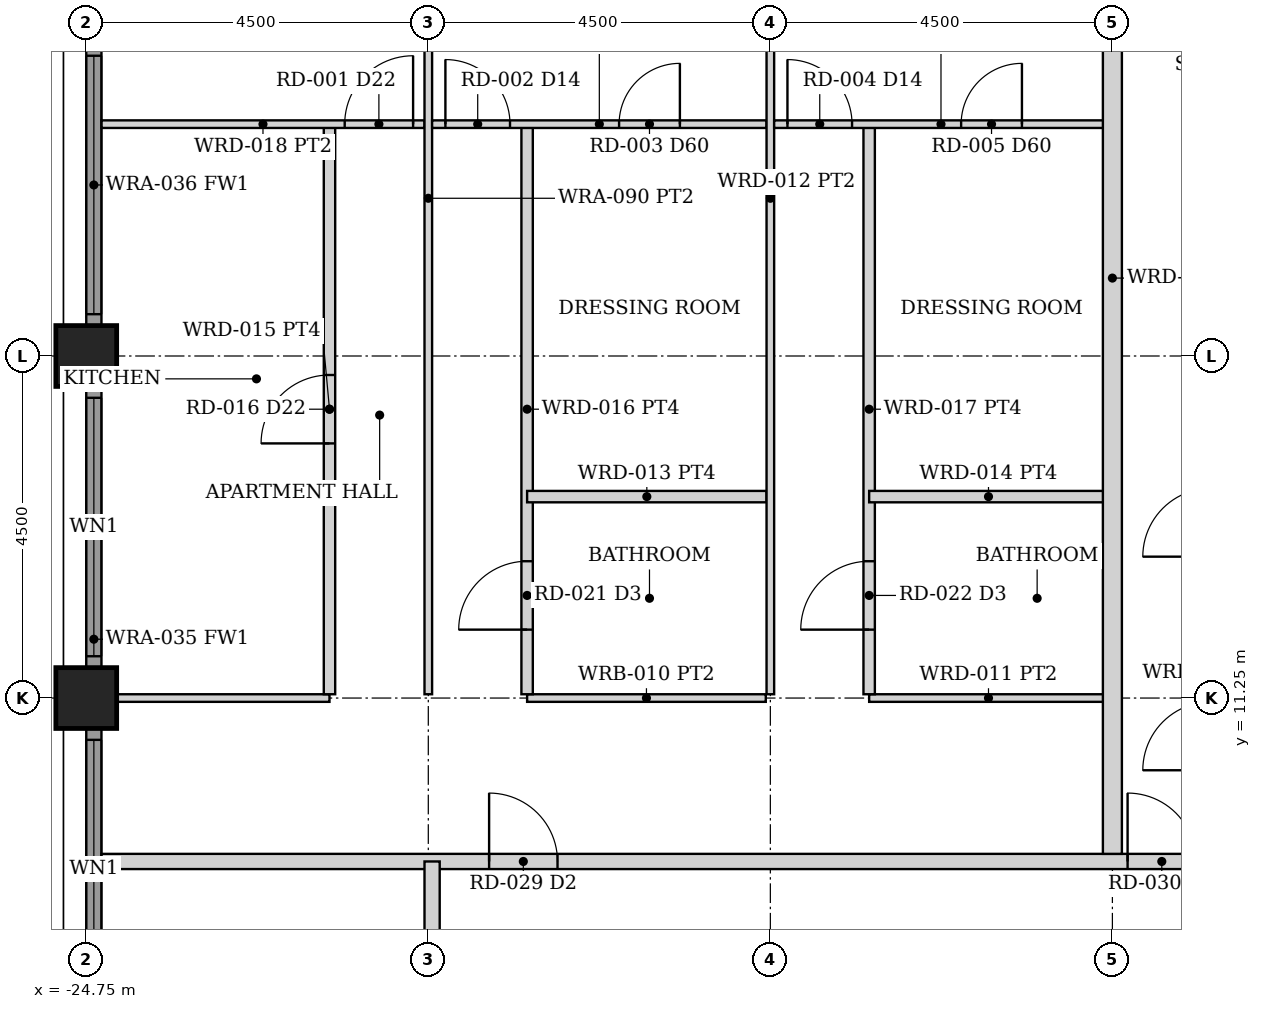
"""IFC4 building model, lengths in metres.
Left out: names, types, materials, properties, quantities, classifications, styles, units other than length and angle.
Written with IfcOpenShell. Run it as: python <this file> out.ifc"""

import sys

from ifc_helpers import new_model, si_unit, direction, frame, frame_2d, origin, origin_2d, place, context, subcontext, project, spatial, rectangle, hollow_rectangle, extrude, element, fill, save


model = new_model("IFC4")
c1 = context("Model", 3, precision=1e-05, world=origin(), true_north=direction((0.0, 1.0)))
c2 = subcontext(c1, "Body", "Model", "MODEL_VIEW")
j1 = project(units=[si_unit("LENGTHUNIT", "METRE"), si_unit("PLANEANGLEUNIT", "RADIAN")], contexts=[c1])
p1 = place(None, origin())
s1 = spatial("IfcSite", under=j1, at=p1, CompositionType="ELEMENT")
p2 = place(p1, origin())
s2 = spatial("IfcBuilding", under=s1, at=p2, CompositionType="ELEMENT")
p3 = place(p2, frame((0.0, 0.0, 58.0)))
s3 = spatial("IfcBuildingStorey", under=s2, at=p3, CompositionType="ELEMENT", Elevation=58.0)
for number, where, z_axis, x_axis in (
    (1, (-24.75, 11.25, 0.0), (0.0, 0.0, 1.0), (1.0, 0.0, 0.0)),
    (2, (-24.75, 15.75, 0.0), (0.0, 0.0, 1.0), (1.0, 0.0, 0.0)),
):
    element("IfcColumn", number, at=place(p3, frame(where, z_axis=z_axis, x_axis=x_axis)), inside=s3, PredefinedType="COLUMN", context=c2, shape_type="SweptSolid", body=[
        extrude(hollow_rectangle(XDim=0.8, YDim=0.8, WallThickness=0.06, at=origin_2d()), origin(), (0.0, 0.0, 1.0), 3.5),
    ])
p4 = place(p3, frame((-24.65, 7.155, 0.0), z_axis=(0.0, 0.0, 1.0), x_axis=(0.0, 1.0, 0.0)))
e3 = element("IfcWall", 3, at=p4, inside=s3, PredefinedType="SOLIDWALL", context=c2, shape_type="SweptSolid", body=[
    extrude(rectangle(XDim=3.69, YDim=0.2, at=frame_2d((1.845, 0.0))), origin(), (0.0, 0.0, 1.0), 2.379),
])
p5 = place(p4, frame((0.145, 0.0, 0.3)))
e4 = element("IfcOpeningElement", 4, at=p5, cuts=e3, PredefinedType="OPENING", context=c2, shape_type="SweptSolid", body=[
    extrude(rectangle(XDim=3.4, YDim=1.929, at=frame_2d((1.7, 0.964))), frame((0.0, 0.11, 0.0), z_axis=(0.0, -1.0, 0.0), x_axis=(1.0, 0.0, 0.0)), (0.0, 0.0, 1.0), 0.22),
])
p6 = place(p3, frame((-24.65, 11.655, 0.0), z_axis=(0.0, 0.0, 1.0), x_axis=(0.0, 1.0, 0.0)))
e5 = element("IfcWall", 5, at=p6, inside=s3, PredefinedType="SOLIDWALL", context=c2, shape_type="SweptSolid", body=[
    extrude(rectangle(XDim=3.69, YDim=0.2, at=frame_2d((1.845, 0.0))), origin(), (0.0, 0.0, 1.0), 2.379),
])
p7 = place(p6, frame((0.145, 0.0, 0.3)))
e6 = element("IfcOpeningElement", 6, at=p7, cuts=e5, PredefinedType="OPENING", context=c2, shape_type="SweptSolid", body=[
    extrude(rectangle(XDim=3.4, YDim=1.929, at=frame_2d((1.7, 0.964))), frame((0.0, 0.11, 0.0), z_axis=(0.0, -1.0, 0.0), x_axis=(1.0, 0.0, 0.0)), (0.0, 0.0, 1.0), 0.22),
])
p8 = place(p3, frame((-24.65, 16.155, 0.0), z_axis=(0.0, 0.0, 1.0), x_axis=(0.0, 1.0, 0.0)))
e7 = element("IfcWall", 7, at=p8, inside=s3, PredefinedType="SOLIDWALL", context=c2, shape_type="SweptSolid", body=[
    extrude(rectangle(XDim=3.69, YDim=0.2, at=frame_2d((1.845, 0.0))), origin(), (0.0, 0.0, 1.0), 2.379),
])
p9 = place(p8, frame((0.145, 0.0, 0.3)))
e8 = element("IfcOpeningElement", 8, at=p9, cuts=e7, PredefinedType="OPENING", context=c2, shape_type="SweptSolid", body=[
    extrude(rectangle(XDim=3.4, YDim=1.929, at=frame_2d((1.7, 0.964))), frame((0.0, 0.11, 0.0), z_axis=(0.0, -1.0, 0.0), x_axis=(1.0, 0.0, 0.0)), (0.0, 0.0, 1.0), 0.22),
])
p10 = place(p3, frame((-24.55, 9.1, 0.0), z_axis=(0.0, 0.0, 1.0), x_axis=(1.0, 0.0, 0.0)))
e9 = element("IfcWall", 9, at=p10, inside=s3, PredefinedType="PARTITIONING", context=c2, shape_type="SweptSolid", body=[
    extrude(rectangle(XDim=49.1, YDim=0.2, at=frame_2d((24.55, 0.0))), origin(), (0.0, 0.0, 1.0), 2.373),
])
p11 = place(p10, frame((5.1, 0.0, 0.0)))
e10 = element("IfcOpeningElement", 10, at=p11, cuts=e9, PredefinedType="OPENING", context=c2, shape_type="SweptSolid", body=[
    extrude(rectangle(XDim=0.9, YDim=2.1, at=frame_2d((0.45, 1.05))), frame((0.0, 0.11, 0.0), z_axis=(0.0, -1.0, 0.0), x_axis=(1.0, 0.0, 0.0)), (0.0, 0.0, 1.0), 0.22),
])
p12 = place(p10, frame((13.5, 0.0, 0.0)))
e11 = element("IfcOpeningElement", 11, at=p12, cuts=e9, PredefinedType="OPENING", context=c2, shape_type="SweptSolid", body=[
    extrude(rectangle(XDim=0.9, YDim=2.1, at=frame_2d((0.45, 1.05))), frame((0.0, 0.11, 0.0), z_axis=(0.0, -1.0, 0.0), x_axis=(1.0, 0.0, 0.0)), (0.0, 0.0, 1.0), 0.22),
])
p13 = place(p10, frame((18.1, 0.0, 0.0)))
e12 = element("IfcOpeningElement", 12, at=p13, cuts=e9, PredefinedType="OPENING", context=c2, shape_type="SweptSolid", body=[
    extrude(rectangle(XDim=0.9, YDim=2.1, at=frame_2d((0.45, 1.05))), frame((0.0, 0.11, 0.0), z_axis=(0.0, -1.0, 0.0), x_axis=(1.0, 0.0, 0.0)), (0.0, 0.0, 1.0), 0.22),
])
p14 = place(p10, frame((31.5, 0.0, 0.0)))
e13 = element("IfcOpeningElement", 13, at=p14, cuts=e9, PredefinedType="OPENING", context=c2, shape_type="SweptSolid", body=[
    extrude(rectangle(XDim=0.9, YDim=2.1, at=frame_2d((0.45, 1.05))), frame((0.0, 0.11, 0.0), z_axis=(0.0, -1.0, 0.0), x_axis=(1.0, 0.0, 0.0)), (0.0, 0.0, 1.0), 0.22),
])
p15 = place(p10, frame((43.1, 0.0, 0.0)))
e14 = element("IfcOpeningElement", 14, at=p15, cuts=e9, PredefinedType="OPENING", context=c2, shape_type="SweptSolid", body=[
    extrude(rectangle(XDim=0.9, YDim=2.1, at=frame_2d((0.45, 1.05))), frame((0.0, 0.11, 0.0), z_axis=(0.0, -1.0, 0.0), x_axis=(1.0, 0.0, 0.0)), (0.0, 0.0, 1.0), 0.22),
])
p16 = place(p3, frame((-20.2, -9.1, 0.0), z_axis=(0.0, 0.0, 1.0), x_axis=(0.0, 1.0, 0.0)))
e15 = element("IfcWall", 15, at=p16, inside=s3, PredefinedType="PARTITIONING", context=c2, shape_type="SweptSolid", body=[
    extrude(rectangle(XDim=18.2, YDim=0.2, at=frame_2d((9.1, 0.0))), origin(), (0.0, 0.0, 1.0), 2.373),
])
p17 = place(p16, frame((8.6, 0.0, 0.0)))
e16 = element("IfcOpeningElement", 16, at=p17, cuts=e15, PredefinedType="OPENING", context=c2, shape_type="SweptSolid", body=[
    extrude(rectangle(XDim=1.0, YDim=2.1, at=frame_2d((0.5, 1.05))), frame((0.0, 0.11, 0.0), z_axis=(0.0, -1.0, 0.0), x_axis=(1.0, 0.0, 0.0)), (0.0, 0.0, 1.0), 0.22),
])
p18 = place(p3, frame((-24.35, 11.25, 0.0), z_axis=(0.0, 0.0, 1.0), x_axis=(1.0, 0.0, 0.0)))
e17 = element("IfcWall", 17, at=p18, inside=s3, PredefinedType="PARTITIONING", context=c2, shape_type="SweptSolid", body=[
    extrude(rectangle(XDim=2.8, YDim=0.1, at=frame_2d((1.4, 0.0))), origin(), (0.0, 0.0, 1.0), 2.373),
])
p19 = place(p3, frame((-21.55, 11.3, 0.0), z_axis=(0.0, 0.0, 1.0), x_axis=(0.0, 1.0, 0.0)))
e18 = element("IfcWall", 18, at=p19, inside=s3, PredefinedType="PARTITIONING", context=c2, shape_type="SweptSolid", body=[
    extrude(rectangle(XDim=7.5, YDim=0.15, at=frame_2d((3.75, 0.0))), origin(), (0.0, 0.0, 1.0), 2.373),
])
p20 = place(p19, frame((3.3, 0.0, 0.0)))
e19 = element("IfcOpeningElement", 19, at=p20, cuts=e18, PredefinedType="OPENING", context=c2, shape_type="SweptSolid", body=[
    extrude(rectangle(XDim=0.9, YDim=2.1, at=frame_2d((0.45, 1.05))), frame((0.0, 0.085, 0.0), z_axis=(0.0, -1.0, 0.0), x_axis=(1.0, 0.0, 0.0)), (0.0, 0.0, 1.0), 0.17),
])
p21 = place(p3, frame((-24.55, 18.8, 0.0), z_axis=(0.0, 0.0, 1.0), x_axis=(1.0, 0.0, 0.0)))
e20 = element("IfcWall", 20, at=p21, inside=s3, PredefinedType="PARTITIONING", context=c2, shape_type="SweptSolid", body=[
    extrude(rectangle(XDim=4.25, YDim=0.1, at=frame_2d((2.125, 0.0))), origin(), (0.0, 0.0, 1.0), 2.373),
])
p22 = place(p21, frame((3.2, 0.0, 0.0)))
e21 = element("IfcOpeningElement", 21, at=p22, cuts=e20, PredefinedType="OPENING", context=c2, shape_type="SweptSolid", body=[
    extrude(rectangle(XDim=0.9, YDim=2.1, at=frame_2d((0.45, 1.05))), frame((0.0, 0.06, 0.0), z_axis=(0.0, -1.0, 0.0), x_axis=(1.0, 0.0, 0.0)), (0.0, 0.0, 1.0), 0.12),
])
p23 = place(p3, frame((-20.25, 11.3, 0.0), z_axis=(0.0, 0.0, 1.0), x_axis=(0.0, 1.0, 0.0)))
e22 = element("IfcWall", 22, at=p23, inside=s3, PredefinedType="PARTITIONING", context=c2, shape_type="SweptSolid", body=[
    extrude(rectangle(XDim=13.05, YDim=0.1, at=frame_2d((6.525, 0.0))), origin(), (0.0, 0.0, 1.0), 2.373),
])
p24 = place(p3, frame((-18.95, 11.25, 0.0), z_axis=(0.0, 0.0, 1.0), x_axis=(1.0, 0.0, 0.0)))
e23 = element("IfcWall", 23, at=p24, inside=s3, PredefinedType="PARTITIONING", context=c2, shape_type="SweptSolid", body=[
    extrude(rectangle(XDim=3.14, YDim=0.1, at=frame_2d((1.57, 0.0))), origin(), (0.0, 0.0, 1.0), 2.373),
])
p25 = place(p3, frame((-18.95, 11.3, 0.0), z_axis=(0.0, 0.0, 1.0), x_axis=(0.0, 1.0, 0.0)))
e24 = element("IfcWall", 24, at=p25, inside=s3, PredefinedType="PARTITIONING", context=c2, shape_type="SweptSolid", body=[
    extrude(rectangle(XDim=7.5, YDim=0.15, at=frame_2d((3.75, 0.0))), origin(), (0.0, 0.0, 1.0), 2.373),
])
p26 = place(p25, frame((0.85, 0.0, 0.0)))
e25 = element("IfcOpeningElement", 25, at=p26, cuts=e24, PredefinedType="OPENING", context=c2, shape_type="SweptSolid", body=[
    extrude(rectangle(XDim=0.9, YDim=2.1, at=frame_2d((0.45, 1.05))), frame((0.0, 0.085, 0.0), z_axis=(0.0, -1.0, 0.0), x_axis=(1.0, 0.0, 0.0)), (0.0, 0.0, 1.0), 0.17),
])
p27 = place(p3, frame((-20.2, 18.8, 0.0), z_axis=(0.0, 0.0, 1.0), x_axis=(1.0, 0.0, 0.0)))
e26 = element("IfcWall", 26, at=p27, inside=s3, PredefinedType="PARTITIONING", context=c2, shape_type="SweptSolid", body=[
    extrude(rectangle(XDim=4.4, YDim=0.1, at=frame_2d((2.2, 0.0))), origin(), (0.0, 0.0, 1.0), 2.373),
])
p28 = place(p27, frame((0.175, 0.0, 0.0)))
e27 = element("IfcOpeningElement", 27, at=p28, cuts=e26, PredefinedType="OPENING", context=c2, shape_type="SweptSolid", body=[
    extrude(rectangle(XDim=0.85, YDim=2.1, at=frame_2d((0.425, 1.05))), frame((0.0, 0.06, 0.0), z_axis=(0.0, -1.0, 0.0), x_axis=(1.0, 0.0, 0.0)), (0.0, 0.0, 1.0), 0.12),
])
p29 = place(p27, frame((2.46, 0.0, 0.0)))
e28 = element("IfcOpeningElement", 28, at=p29, cuts=e26, PredefinedType="OPENING", context=c2, shape_type="SweptSolid", body=[
    extrude(rectangle(XDim=0.8, YDim=2.1, at=frame_2d((0.4, 1.05))), frame((0.0, 0.06, 0.0), z_axis=(0.0, -1.0, 0.0), x_axis=(1.0, 0.0, 0.0)), (0.0, 0.0, 1.0), 0.12),
])
p30 = place(p3, frame((-18.95, 13.9, 0.0), z_axis=(0.0, 0.0, 1.0), x_axis=(1.0, 0.0, 0.0)))
e29 = element("IfcWall", 29, at=p30, inside=s3, PredefinedType="PARTITIONING", context=c2, shape_type="SweptSolid", body=[
    extrude(rectangle(XDim=3.15, YDim=0.15, at=frame_2d((1.575, 0.0))), origin(), (0.0, 0.0, 1.0), 2.373),
])
p31 = place(p3, frame((-15.75, 11.3, 0.0), z_axis=(0.0, 0.0, 1.0), x_axis=(0.0, 1.0, 0.0)))
e30 = element("IfcWall", 30, at=p31, inside=s3, PredefinedType="PARTITIONING", context=c2, shape_type="SweptSolid", body=[
    extrude(rectangle(XDim=13.05, YDim=0.1, at=frame_2d((6.525, 0.0))), origin(), (0.0, 0.0, 1.0), 2.373),
])
p32 = place(p3, frame((-14.45, 11.25, 0.0), z_axis=(0.0, 0.0, 1.0), x_axis=(1.0, 0.0, 0.0)))
e31 = element("IfcWall", 31, at=p32, inside=s3, PredefinedType="PARTITIONING", context=c2, shape_type="SweptSolid", body=[
    extrude(rectangle(XDim=3.14, YDim=0.1, at=frame_2d((1.57, 0.0))), origin(), (0.0, 0.0, 1.0), 2.373),
])
p33 = place(p3, frame((-14.45, 11.3, 0.0), z_axis=(0.0, 0.0, 1.0), x_axis=(0.0, 1.0, 0.0)))
e32 = element("IfcWall", 32, at=p33, inside=s3, PredefinedType="PARTITIONING", context=c2, shape_type="SweptSolid", body=[
    extrude(rectangle(XDim=7.5, YDim=0.15, at=frame_2d((3.75, 0.0))), origin(), (0.0, 0.0, 1.0), 2.373),
])
p34 = place(p33, frame((0.85, 0.0, 0.0)))
e33 = element("IfcOpeningElement", 33, at=p34, cuts=e32, PredefinedType="OPENING", context=c2, shape_type="SweptSolid", body=[
    extrude(rectangle(XDim=0.9, YDim=2.1, at=frame_2d((0.45, 1.05))), frame((0.0, 0.085, 0.0), z_axis=(0.0, -1.0, 0.0), x_axis=(1.0, 0.0, 0.0)), (0.0, 0.0, 1.0), 0.17),
])
p35 = place(p3, frame((-15.7, 18.8, 0.0), z_axis=(0.0, 0.0, 1.0), x_axis=(1.0, 0.0, 0.0)))
e34 = element("IfcWall", 34, at=p35, inside=s3, PredefinedType="PARTITIONING", context=c2, shape_type="SweptSolid", body=[
    extrude(rectangle(XDim=4.39, YDim=0.1, at=frame_2d((2.195, 0.0))), origin(), (0.0, 0.0, 1.0), 2.373),
])
p36 = place(p35, frame((0.175, 0.0, 0.0)))
e35 = element("IfcOpeningElement", 35, at=p36, cuts=e34, PredefinedType="OPENING", context=c2, shape_type="SweptSolid", body=[
    extrude(rectangle(XDim=0.85, YDim=2.1, at=frame_2d((0.425, 1.05))), frame((0.0, 0.06, 0.0), z_axis=(0.0, -1.0, 0.0), x_axis=(1.0, 0.0, 0.0)), (0.0, 0.0, 1.0), 0.12),
])
p37 = place(p35, frame((2.46, 0.0, 0.0)))
e36 = element("IfcOpeningElement", 36, at=p37, cuts=e34, PredefinedType="OPENING", context=c2, shape_type="SweptSolid", body=[
    extrude(rectangle(XDim=0.8, YDim=2.1, at=frame_2d((0.4, 1.05))), frame((0.0, 0.06, 0.0), z_axis=(0.0, -1.0, 0.0), x_axis=(1.0, 0.0, 0.0)), (0.0, 0.0, 1.0), 0.12),
])
p38 = place(p3, frame((-14.45, 13.9, 0.0), z_axis=(0.0, 0.0, 1.0), x_axis=(1.0, 0.0, 0.0)))
e37 = element("IfcWall", 37, at=p38, inside=s3, PredefinedType="PARTITIONING", context=c2, shape_type="SweptSolid", body=[
    extrude(rectangle(XDim=3.14, YDim=0.15, at=frame_2d((1.57, 0.0))), origin(), (0.0, 0.0, 1.0), 2.373),
])
p39 = place(p3, frame((-11.25, 9.2, 0.0), z_axis=(0.0, 0.0, 1.0), x_axis=(0.0, 1.0, 0.0)))
e38 = element("IfcWall", 38, at=p39, inside=s3, PredefinedType="PARTITIONING", context=c2, shape_type="SweptSolid", body=[
    extrude(rectangle(XDim=15.15, YDim=0.25, at=frame_2d((7.575, 0.0))), origin(), (0.0, 0.0, 1.0), 2.373),
])
p40 = place(p5, origin())
e39 = element("IfcWindow", 39, at=p40, inside=s3, PartitioningType="SINGLE_PANEL", PredefinedType="WINDOW", context=c2, shape_type="SweptSolid", body=[
    extrude(rectangle(XDim=3.4, YDim=1.929, at=frame_2d((1.7, 0.964))), frame((0.0, 0.03, 0.0), z_axis=(0.0, -1.0, 0.0), x_axis=(1.0, 0.0, 0.0)), (0.0, 0.0, 1.0), 0.06),
])
fill(e4, e39)
p41 = place(p7, origin())
e40 = element("IfcWindow", 40, at=p41, inside=s3, PartitioningType="SINGLE_PANEL", PredefinedType="WINDOW", context=c2, shape_type="SweptSolid", body=[
    extrude(rectangle(XDim=3.4, YDim=1.929, at=frame_2d((1.7, 0.964))), frame((0.0, 0.03, 0.0), z_axis=(0.0, -1.0, 0.0), x_axis=(1.0, 0.0, 0.0)), (0.0, 0.0, 1.0), 0.06),
])
fill(e6, e40)
p42 = place(p9, origin())
e41 = element("IfcWindow", 41, at=p42, inside=s3, PartitioningType="SINGLE_PANEL", PredefinedType="WINDOW", context=c2, shape_type="SweptSolid", body=[
    extrude(rectangle(XDim=3.4, YDim=1.929, at=frame_2d((1.7, 0.964))), frame((0.0, 0.03, 0.0), z_axis=(0.0, -1.0, 0.0), x_axis=(1.0, 0.0, 0.0)), (0.0, 0.0, 1.0), 0.06),
])
fill(e8, e41)
p43 = place(p11, origin())
e42 = element("IfcDoor", 42, at=p43, inside=s3, OperationType="SINGLE_SWING_LEFT", PredefinedType="DOOR", context=c2, shape_type="SweptSolid", body=[
    extrude(rectangle(XDim=0.9, YDim=2.1, at=frame_2d((0.45, 1.05))), frame((0.0, 0.025, 0.0), z_axis=(0.0, -1.0, 0.0), x_axis=(1.0, 0.0, 0.0)), (0.0, 0.0, 1.0), 0.05),
])
fill(e10, e42)
p44 = place(p20, origin())
e43 = element("IfcDoor", 43, at=p44, inside=s3, OperationType="SINGLE_SWING_LEFT", PredefinedType="DOOR", context=c2, shape_type="SweptSolid", body=[
    extrude(rectangle(XDim=0.9, YDim=2.1, at=frame_2d((0.45, 1.05))), frame((0.0, 0.025, 0.0), z_axis=(0.0, -1.0, 0.0), x_axis=(1.0, 0.0, 0.0)), (0.0, 0.0, 1.0), 0.05),
])
fill(e19, e43)
p45 = place(p22, origin())
e44 = element("IfcDoor", 44, at=p45, inside=s3, OperationType="SINGLE_SWING_RIGHT", PredefinedType="DOOR", context=c2, shape_type="SweptSolid", body=[
    extrude(rectangle(XDim=0.9, YDim=2.1, at=frame_2d((0.45, 1.05))), frame((0.0, 0.025, 0.0), z_axis=(0.0, -1.0, 0.0), x_axis=(1.0, 0.0, 0.0)), (0.0, 0.0, 1.0), 0.05),
])
fill(e21, e44)
p46 = place(p28, origin())
e45 = element("IfcDoor", 45, at=p46, inside=s3, OperationType="SINGLE_SWING_LEFT", PredefinedType="DOOR", context=c2, shape_type="SweptSolid", body=[
    extrude(rectangle(XDim=0.85, YDim=2.1, at=frame_2d((0.425, 1.05))), frame((0.0, 0.025, 0.0), z_axis=(0.0, -1.0, 0.0), x_axis=(1.0, 0.0, 0.0)), (0.0, 0.0, 1.0), 0.05),
])
fill(e27, e45)
p47 = place(p26, origin())
e46 = element("IfcDoor", 46, at=p47, inside=s3, OperationType="SINGLE_SWING_LEFT", PredefinedType="DOOR", context=c2, shape_type="SweptSolid", body=[
    extrude(rectangle(XDim=0.9, YDim=2.1, at=frame_2d((0.45, 1.05))), frame((0.0, 0.025, 0.0), z_axis=(0.0, -1.0, 0.0), x_axis=(1.0, 0.0, 0.0)), (0.0, 0.0, 1.0), 0.05),
])
fill(e25, e46)
p48 = place(p29, origin())
e47 = element("IfcDoor", 47, at=p48, inside=s3, OperationType="SINGLE_SWING_RIGHT", PredefinedType="DOOR", context=c2, shape_type="SweptSolid", body=[
    extrude(rectangle(XDim=0.8, YDim=2.1, at=frame_2d((0.4, 1.05))), frame((0.0, 0.025, 0.0), z_axis=(0.0, -1.0, 0.0), x_axis=(1.0, 0.0, 0.0)), (0.0, 0.0, 1.0), 0.05),
])
fill(e28, e47)
p49 = place(p36, origin())
e48 = element("IfcDoor", 48, at=p49, inside=s3, OperationType="SINGLE_SWING_LEFT", PredefinedType="DOOR", context=c2, shape_type="SweptSolid", body=[
    extrude(rectangle(XDim=0.85, YDim=2.1, at=frame_2d((0.425, 1.05))), frame((0.0, 0.025, 0.0), z_axis=(0.0, -1.0, 0.0), x_axis=(1.0, 0.0, 0.0)), (0.0, 0.0, 1.0), 0.05),
])
fill(e35, e48)
p50 = place(p34, origin())
e49 = element("IfcDoor", 49, at=p50, inside=s3, OperationType="SINGLE_SWING_LEFT", PredefinedType="DOOR", context=c2, shape_type="SweptSolid", body=[
    extrude(rectangle(XDim=0.9, YDim=2.1, at=frame_2d((0.45, 1.05))), frame((0.0, 0.025, 0.0), z_axis=(0.0, -1.0, 0.0), x_axis=(1.0, 0.0, 0.0)), (0.0, 0.0, 1.0), 0.05),
])
fill(e33, e49)
p51 = place(p37, origin())
e50 = element("IfcDoor", 50, at=p51, inside=s3, OperationType="SINGLE_SWING_RIGHT", PredefinedType="DOOR", context=c2, shape_type="SweptSolid", body=[
    extrude(rectangle(XDim=0.8, YDim=2.1, at=frame_2d((0.4, 1.05))), frame((0.0, 0.025, 0.0), z_axis=(0.0, -1.0, 0.0), x_axis=(1.0, 0.0, 0.0)), (0.0, 0.0, 1.0), 0.05),
])
fill(e36, e50)
p52 = place(p12, origin())
e51 = element("IfcDoor", 51, at=p52, inside=s3, OperationType="SINGLE_SWING_LEFT", PredefinedType="DOOR", context=c2, shape_type="SweptSolid", body=[
    extrude(rectangle(XDim=0.9, YDim=2.1, at=frame_2d((0.45, 1.05))), frame((0.0, 0.025, 0.0), z_axis=(0.0, -1.0, 0.0), x_axis=(1.0, 0.0, 0.0)), (0.0, 0.0, 1.0), 0.05),
])
fill(e11, e51)
save(model, sys.argv[1])
